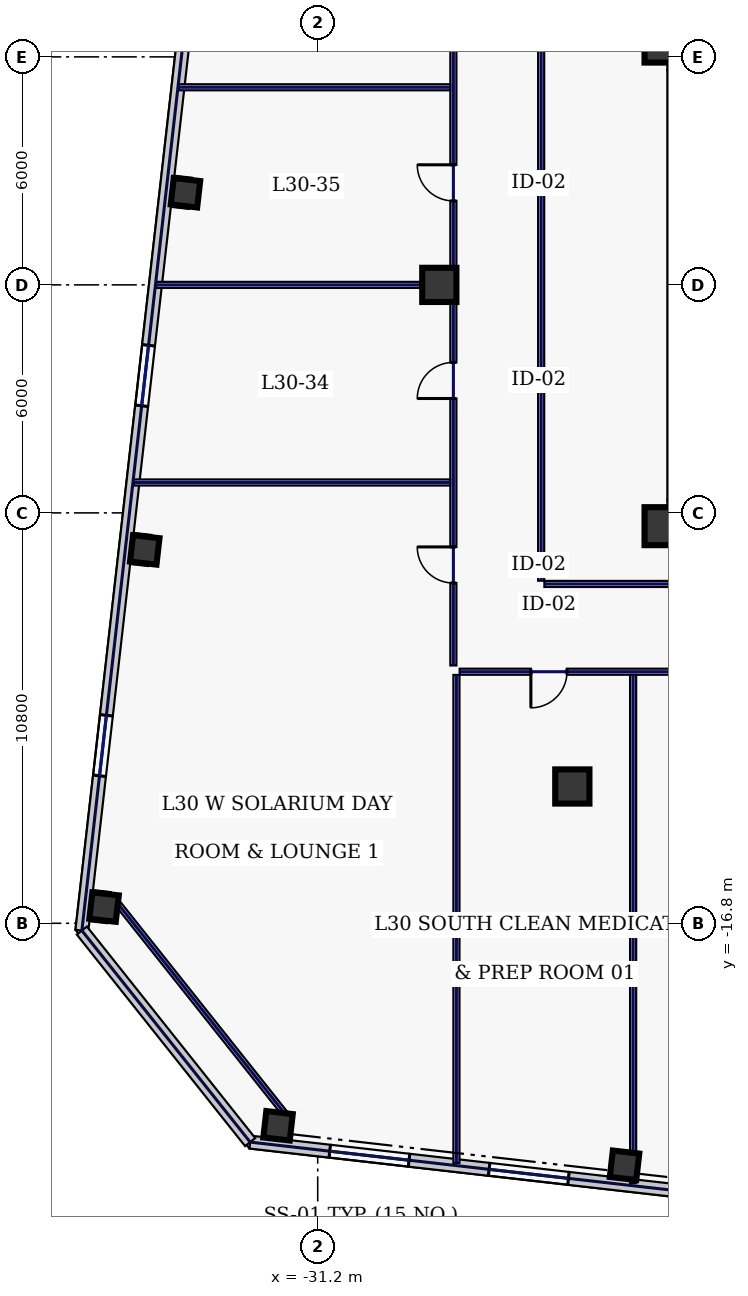
"""IFC4 building model, lengths in metres.
Left out: names, types, materials, properties, quantities, classifications, styles, units other than length and angle.
Written with IfcOpenShell. Run it as: python <this file> out.ifc"""

import sys

from ifc_helpers import new_model, si_unit, direction, frame, frame_2d, origin, origin_2d, place, context, subcontext, project, spatial, rectangle, hollow_rectangle, extrude, element, fill, save


model = new_model("IFC4")
c1 = context("Model", 3, precision=1e-05, world=origin(), true_north=direction((0.0, 1.0)))
c2 = subcontext(c1, "Body", "Model", "MODEL_VIEW")
j1 = project(units=[si_unit("LENGTHUNIT", "METRE"), si_unit("PLANEANGLEUNIT", "RADIAN")], contexts=[c1])
p1 = place(None, origin())
s1 = spatial("IfcSite", under=j1, at=p1, CompositionType="ELEMENT")
p2 = place(p1, origin())
s2 = spatial("IfcBuilding", under=s1, at=p2, CompositionType="ELEMENT")
p3 = place(p2, frame((0.0, 0.0, 133.4)))
s3 = spatial("IfcBuildingStorey", under=s2, at=p3, CompositionType="ELEMENT", Elevation=133.4)
for number, where, z_axis, x_axis in (
    (1, (-22.0, 6.0, 0.0), (0.0, 0.0, 1.0), (1.0, 0.0, 0.0)),
    (2, (-22.0, -6.0, 0.0), (0.0, 0.0, 1.0), (1.0, 0.0, 0.0)),
):
    element("IfcWall", number, at=place(p3, frame(where, z_axis=z_axis, x_axis=x_axis)), inside=s3, PredefinedType="SHEAR", context=c2, shape_type="SweptSolid", body=[
        extrude(rectangle(XDim=11.55, YDim=0.7, at=frame_2d((5.775, 0.0))), origin(), (0.0, 0.0, 1.0), 3.74),
    ])
p4 = place(p3, frame((-21.6, -5.65, 0.0), z_axis=(0.0, 0.0, 1.0), x_axis=(0.0, 1.0, 0.0)))
e3 = element("IfcWall", 3, at=p4, inside=s3, PredefinedType="SHEAR", context=c2, shape_type="SweptSolid", body=[
    extrude(rectangle(XDim=11.3, YDim=0.8, at=frame_2d((5.65, 0.0))), origin(), (0.0, 0.0, 1.0), 3.74),
])
for number, where, z_axis, x_axis in (
    (4, (-22.1, -6.35, 0.0), (0.0, 0.0, 1.0), (1.0, 0.0, 0.0)),
    (5, (-22.1, 6.35, 0.0), (0.0, 0.0, 1.0), (1.0, 0.0, 0.0)),
):
    element("IfcColumn", number, at=place(p3, frame(where, z_axis=z_axis, x_axis=x_axis)), inside=s3, PredefinedType="COLUMN", context=c2, shape_type="SweptSolid", body=[
        extrude(hollow_rectangle(XDim=1.0, YDim=1.0, WallThickness=0.045, at=origin_2d()), origin(), (0.0, 0.0, 1.0), 3.74),
    ])
for number, where, z_axis, x_axis in (
    (6, (-24.5, -13.2, 0.0), (0.0, 0.0, 1.0), (1.0, 0.0, 0.0)),
    (7, (-28.0, 0.0, 0.0), (0.0, 0.0, 1.0), (1.0, 0.0, 0.0)),
):
    element("IfcColumn", number, at=place(p3, frame(where, z_axis=z_axis, x_axis=x_axis)), inside=s3, PredefinedType="COLUMN", context=c2, shape_type="SweptSolid", body=[
        extrude(hollow_rectangle(XDim=0.9, YDim=0.9, WallThickness=0.04, at=origin_2d()), origin(), (0.0, 0.0, 1.0), 3.74),
    ])
for number, where, z_axis, x_axis in (
    (8, (-32.244, -22.129, 0.0), (0.0, 0.0, 1.0), (0.994, -0.113, 0.0)),
    (9, (-23.126, -23.168, 0.0), (0.0, 0.0, 1.0), (0.994, -0.113, 0.0)),
    (10, (-34.68, 2.425, 0.0), (0.0, 0.0, 1.0), (0.994, -0.113, 0.0)),
    (11, (-35.751, -6.974, 0.0), (0.0, 0.0, 1.0), (0.994, -0.113, 0.0)),
    (12, (-36.822, -16.374, 0.0), (0.0, 0.0, 1.0), (0.994, -0.113, 0.0)),
):
    element("IfcColumn", number, at=place(p3, frame(where, z_axis=z_axis, x_axis=x_axis)), inside=s3, PredefinedType="COLUMN", context=c2, shape_type="SweptSolid", body=[
        extrude(hollow_rectangle(XDim=0.7, YDim=0.7, WallThickness=0.032, at=origin_2d()), origin(), (0.0, 0.0, 1.0), 3.74),
    ])
p5 = place(p3, frame((-32.977, -22.559, 0.0), z_axis=(0.0, 0.0, 1.0), x_axis=(0.993571214605, -0.113208840243, 0.0)))
e13 = element("IfcWall", 13, at=p5, inside=s3, PredefinedType="STANDARD", context=c2, shape_type="SweptSolid", body=[
    extrude(rectangle(XDim=21.223, YDim=0.34, at=frame_2d((10.611, 0.0))), origin(), (0.0, 0.0, 1.0), 3.74),
])
p6 = place(p5, frame((2.108, 0.0, 0.67)))
e14 = element("IfcOpeningElement", 14, at=p6, cuts=e13, PredefinedType="OPENING", context=c2, shape_type="SweptSolid", body=[
    extrude(rectangle(XDim=2.1, YDim=2.2, at=frame_2d((1.05, 1.1))), frame((0.0, 0.18, 0.0), z_axis=(0.0, -1.0, 0.0), x_axis=(1.0, 0.0, 0.0)), (0.0, 0.0, 1.0), 0.36),
])
p7 = place(p5, frame((6.329, 0.0, 0.67)))
e15 = element("IfcOpeningElement", 15, at=p7, cuts=e13, PredefinedType="OPENING", context=c2, shape_type="SweptSolid", body=[
    extrude(rectangle(XDim=2.1, YDim=2.2, at=frame_2d((1.05, 1.1))), frame((0.0, 0.18, 0.0), z_axis=(0.0, -1.0, 0.0), x_axis=(1.0, 0.0, 0.0)), (0.0, 0.0, 1.0), 0.36),
])
p8 = place(p5, frame((11.285, 0.0, 0.67)))
e16 = element("IfcOpeningElement", 16, at=p8, cuts=e13, PredefinedType="OPENING", context=c2, shape_type="SweptSolid", body=[
    extrude(rectangle(XDim=2.1, YDim=2.2, at=frame_2d((1.05, 1.1))), frame((0.0, 0.18, 0.0), z_axis=(0.0, -1.0, 0.0), x_axis=(1.0, 0.0, 0.0)), (0.0, 0.0, 1.0), 0.36),
])
p9 = place(p5, frame((16.756, 0.0, 0.67)))
e17 = element("IfcOpeningElement", 17, at=p9, cuts=e13, PredefinedType="OPENING", context=c2, shape_type="SweptSolid", body=[
    extrude(rectangle(XDim=0.85, YDim=1.85, at=frame_2d((0.425, 0.925))), frame((0.0, 0.18, 0.0), z_axis=(0.0, -1.0, 0.0), x_axis=(1.0, 0.0, 0.0)), (0.0, 0.0, 1.0), 0.36),
])
p10 = place(p3, frame((-32.968, 21.957, 0.0), z_axis=(0.0, 0.0, 1.0), x_axis=(-0.113201605824, -0.993572038877, 0.0)))
e18 = element("IfcWall", 18, at=p10, inside=s3, PredefinedType="STANDARD", context=c2, shape_type="SweptSolid", body=[
    extrude(rectangle(XDim=39.2, YDim=0.34, at=frame_2d((19.6, 0.0))), origin(), (0.0, 0.0, 1.0), 3.74),
])
p11 = place(p10, frame((4.1, 0.0, 0.58)))
e19 = element("IfcOpeningElement", 19, at=p11, cuts=e18, PredefinedType="OPENING", context=c2, shape_type="SweptSolid", body=[
    extrude(rectangle(XDim=1.6, YDim=2.3, at=frame_2d((0.8, 1.15))), frame((0.0, 0.18, 0.0), z_axis=(0.0, -1.0, 0.0), x_axis=(1.0, 0.0, 0.0)), (0.0, 0.0, 1.0), 0.36),
])
p12 = place(p10, frame((13.9, 0.0, 0.58)))
e20 = element("IfcOpeningElement", 20, at=p12, cuts=e18, PredefinedType="OPENING", context=c2, shape_type="SweptSolid", body=[
    extrude(rectangle(XDim=1.6, YDim=2.3, at=frame_2d((0.8, 1.15))), frame((0.0, 0.18, 0.0), z_axis=(0.0, -1.0, 0.0), x_axis=(1.0, 0.0, 0.0)), (0.0, 0.0, 1.0), 0.36),
])
p13 = place(p10, frame((23.7, 0.0, 0.58)))
e21 = element("IfcOpeningElement", 21, at=p13, cuts=e18, PredefinedType="OPENING", context=c2, shape_type="SweptSolid", body=[
    extrude(rectangle(XDim=1.6, YDim=2.3, at=frame_2d((0.8, 1.15))), frame((0.0, 0.18, 0.0), z_axis=(0.0, -1.0, 0.0), x_axis=(1.0, 0.0, 0.0)), (0.0, 0.0, 1.0), 0.36),
])
p14 = place(p10, frame((33.5, 0.0, 0.58)))
e22 = element("IfcOpeningElement", 22, at=p14, cuts=e18, PredefinedType="OPENING", context=c2, shape_type="SweptSolid", body=[
    extrude(rectangle(XDim=1.6, YDim=2.3, at=frame_2d((0.8, 1.15))), frame((0.0, 0.18, 0.0), z_axis=(0.0, -1.0, 0.0), x_axis=(1.0, 0.0, 0.0)), (0.0, 0.0, 1.0), 0.36),
])
p15 = place(p3, frame((-37.406, -16.991, 0.0), z_axis=(0.0, 0.0, 1.0), x_axis=(0.622507800567, -0.78261359446, 0.0)))
e23 = element("IfcWall", 23, at=p15, inside=s3, PredefinedType="STANDARD", context=c2, shape_type="SweptSolid", body=[
    extrude(rectangle(XDim=7.114, YDim=0.34, at=frame_2d((3.557, 0.0))), origin(), (0.0, 0.0, 1.0), 3.74),
])
p16 = place(p3, frame((-36.556, -16.162, 0.0), z_axis=(0.0, 0.0, 1.0), x_axis=(0.622522641622, -0.782601789334, 0.0)))
e24 = element("IfcWall", 24, at=p16, inside=s3, PredefinedType="PARTITIONING", context=c2, shape_type="SweptSolid", body=[
    extrude(rectangle(XDim=7.354, YDim=0.16, at=frame_2d((3.677, 0.0))), origin(), (0.0, 0.0, 1.0), 3.74),
])
p17 = place(p3, frame((-27.63, -10.015, 0.0), z_axis=(0.0, 0.0, 1.0), x_axis=(0.0, 1.0, 0.0)))
e25 = element("IfcWall", 25, at=p17, inside=s3, PredefinedType="PARTITIONING", context=c2, shape_type="SweptSolid", body=[
    extrude(rectangle(XDim=20.13, YDim=0.16, at=frame_2d((10.065, 0.0))), origin(), (0.0, 0.0, 1.0), 3.74),
])
p18 = place(p17, frame((2.169, 0.0, 0.0)))
e26 = element("IfcOpeningElement", 26, at=p18, cuts=e25, PredefinedType="OPENING", context=c2, shape_type="SweptSolid", body=[
    extrude(rectangle(XDim=0.95, YDim=2.2, at=frame_2d((0.475, 1.1))), frame((0.0, 0.09, 0.0), z_axis=(0.0, -1.0, 0.0), x_axis=(1.0, 0.0, 0.0)), (0.0, 0.0, 1.0), 0.18),
])
p19 = place(p17, frame((7.025, 0.0, 0.0)))
e27 = element("IfcOpeningElement", 27, at=p19, cuts=e25, PredefinedType="OPENING", context=c2, shape_type="SweptSolid", body=[
    extrude(rectangle(XDim=0.95, YDim=2.2, at=frame_2d((0.475, 1.1))), frame((0.0, 0.09, 0.0), z_axis=(0.0, -1.0, 0.0), x_axis=(1.0, 0.0, 0.0)), (0.0, 0.0, 1.0), 0.18),
])
p20 = place(p17, frame((12.225, 0.0, 0.0)))
e28 = element("IfcOpeningElement", 28, at=p20, cuts=e25, PredefinedType="OPENING", context=c2, shape_type="SweptSolid", body=[
    extrude(rectangle(XDim=0.95, YDim=2.2, at=frame_2d((0.475, 1.1))), frame((0.0, 0.09, 0.0), z_axis=(0.0, -1.0, 0.0), x_axis=(1.0, 0.0, 0.0)), (0.0, 0.0, 1.0), 0.18),
])
p21 = place(p17, frame((17.131, 0.0, 0.0)))
e29 = element("IfcOpeningElement", 29, at=p21, cuts=e25, PredefinedType="OPENING", context=c2, shape_type="SweptSolid", body=[
    extrude(rectangle(XDim=0.95, YDim=2.2, at=frame_2d((0.475, 1.1))), frame((0.0, 0.09, 0.0), z_axis=(0.0, -1.0, 0.0), x_axis=(1.0, 0.0, 0.0)), (0.0, 0.0, 1.0), 0.18),
])
p22 = place(p3, frame((27.465, -10.18, 0.0), z_axis=(0.0, 0.0, 1.0), x_axis=(-1.0, 0.0, 0.0)))
e30 = element("IfcWall", 30, at=p22, inside=s3, PredefinedType="PARTITIONING", context=c2, shape_type="SweptSolid", body=[
    extrude(rectangle(XDim=54.93, YDim=0.16, at=frame_2d((27.465, 0.0))), origin(), (0.0, 0.0, 1.0), 3.74),
])
p23 = place(p22, frame((52.106, 0.0, 0.0)))
e31 = element("IfcOpeningElement", 31, at=p23, cuts=e30, PredefinedType="OPENING", context=c2, shape_type="SweptSolid", body=[
    extrude(rectangle(XDim=0.95, YDim=2.2, at=frame_2d((0.475, 1.1))), frame((0.0, 0.09, 0.0), z_axis=(0.0, -1.0, 0.0), x_axis=(1.0, 0.0, 0.0)), (0.0, 0.0, 1.0), 0.18),
])
p24 = place(p22, frame((47.05, 0.0, 0.0)))
e32 = element("IfcOpeningElement", 32, at=p24, cuts=e30, PredefinedType="OPENING", context=c2, shape_type="SweptSolid", body=[
    extrude(rectangle(XDim=0.95, YDim=2.2, at=frame_2d((0.475, 1.1))), frame((0.0, 0.09, 0.0), z_axis=(0.0, -1.0, 0.0), x_axis=(1.0, 0.0, 0.0)), (0.0, 0.0, 1.0), 0.18),
])
p25 = place(p22, frame((41.65, 0.0, 0.0)))
e33 = element("IfcOpeningElement", 33, at=p25, cuts=e30, PredefinedType="OPENING", context=c2, shape_type="SweptSolid", body=[
    extrude(rectangle(XDim=0.95, YDim=2.2, at=frame_2d((0.475, 1.1))), frame((0.0, 0.09, 0.0), z_axis=(0.0, -1.0, 0.0), x_axis=(1.0, 0.0, 0.0)), (0.0, 0.0, 1.0), 0.18),
])
p26 = place(p22, frame((35.825, 0.0, 0.0)))
e34 = element("IfcOpeningElement", 34, at=p26, cuts=e30, PredefinedType="OPENING", context=c2, shape_type="SweptSolid", body=[
    extrude(rectangle(XDim=0.95, YDim=2.2, at=frame_2d((0.475, 1.1))), frame((0.0, 0.09, 0.0), z_axis=(0.0, -1.0, 0.0), x_axis=(1.0, 0.0, 0.0)), (0.0, 0.0, 1.0), 0.18),
])
p27 = place(p22, frame((29.575, 0.0, 0.0)))
e35 = element("IfcOpeningElement", 35, at=p27, cuts=e30, PredefinedType="OPENING", context=c2, shape_type="SweptSolid", body=[
    extrude(rectangle(XDim=0.95, YDim=2.2, at=frame_2d((0.475, 1.1))), frame((0.0, 0.09, 0.0), z_axis=(0.0, -1.0, 0.0), x_axis=(1.0, 0.0, 0.0)), (0.0, 0.0, 1.0), 0.18),
])
p28 = place(p22, frame((23.285, 0.0, 0.0)))
e36 = element("IfcOpeningElement", 36, at=p28, cuts=e30, PredefinedType="OPENING", context=c2, shape_type="SweptSolid", body=[
    extrude(rectangle(XDim=0.95, YDim=2.2, at=frame_2d((0.475, 1.1))), frame((0.0, 0.09, 0.0), z_axis=(0.0, -1.0, 0.0), x_axis=(1.0, 0.0, 0.0)), (0.0, 0.0, 1.0), 0.18),
])
p29 = place(p22, frame((16.78, 0.0, 0.0)))
e37 = element("IfcOpeningElement", 37, at=p29, cuts=e30, PredefinedType="OPENING", context=c2, shape_type="SweptSolid", body=[
    extrude(rectangle(XDim=1.3, YDim=2.2, at=frame_2d((0.65, 1.1))), frame((0.0, 0.09, 0.0), z_axis=(0.0, -1.0, 0.0), x_axis=(1.0, 0.0, 0.0)), (0.0, 0.0, 1.0), 0.18),
])
p30 = place(p22, frame((11.23, 0.0, 0.0)))
e38 = element("IfcOpeningElement", 38, at=p30, cuts=e30, PredefinedType="OPENING", context=c2, shape_type="SweptSolid", body=[
    extrude(rectangle(XDim=1.3, YDim=2.2, at=frame_2d((0.65, 1.1))), frame((0.0, 0.09, 0.0), z_axis=(0.0, -1.0, 0.0), x_axis=(1.0, 0.0, 0.0)), (0.0, 0.0, 1.0), 0.18),
])
p31 = place(p22, frame((6.46, 0.0, 0.0)))
e39 = element("IfcOpeningElement", 39, at=p31, cuts=e30, PredefinedType="OPENING", context=c2, shape_type="SweptSolid", body=[
    extrude(rectangle(XDim=1.3, YDim=2.2, at=frame_2d((0.65, 1.1))), frame((0.0, 0.09, 0.0), z_axis=(0.0, -1.0, 0.0), x_axis=(1.0, 0.0, 0.0)), (0.0, 0.0, 1.0), 0.18),
])
p32 = place(p22, frame((2.194, 0.0, 0.0)))
e40 = element("IfcOpeningElement", 40, at=p32, cuts=e30, PredefinedType="OPENING", context=c2, shape_type="SweptSolid", body=[
    extrude(rectangle(XDim=0.95, YDim=2.2, at=frame_2d((0.475, 1.1))), frame((0.0, 0.09, 0.0), z_axis=(0.0, -1.0, 0.0), x_axis=(1.0, 0.0, 0.0)), (0.0, 0.0, 1.0), 0.18),
])
p33 = place(p3, frame((-25.32, 7.885, 0.0), z_axis=(0.0, 0.0, 1.0), x_axis=(0.0, -1.0, 0.0)))
e41 = element("IfcWall", 41, at=p33, inside=s3, PredefinedType="PARTITIONING", context=c2, shape_type="SweptSolid", body=[
    extrude(rectangle(XDim=15.67, YDim=0.16, at=frame_2d((7.835, 0.0))), origin(), (0.0, 0.0, 1.0), 3.74),
])
p34 = place(p3, frame((-25.235, -7.87, 0.0), z_axis=(0.0, 0.0, 1.0), x_axis=(1.0, 0.0, 0.0)))
e42 = element("IfcWall", 42, at=p34, inside=s3, PredefinedType="PARTITIONING", context=c2, shape_type="SweptSolid", body=[
    extrude(rectangle(XDim=14.57, YDim=0.16, at=frame_2d((7.285, 0.0))), origin(), (0.0, 0.0, 1.0), 3.74),
])
p35 = place(p3, frame((-27.55, -23.106, 0.0), z_axis=(0.0, 0.0, 1.0), x_axis=(0.0, 1.0, 0.0)))
e43 = element("IfcWall", 43, at=p35, inside=s3, PredefinedType="PARTITIONING", context=c2, shape_type="SweptSolid", body=[
    extrude(rectangle(XDim=12.842, YDim=0.16, at=frame_2d((6.421, 0.0))), origin(), (0.0, 0.0, 1.0), 3.74),
])
p36 = place(p3, frame((-22.9, -23.636, 0.0), z_axis=(0.0, 0.0, 1.0), x_axis=(0.0, 1.0, 0.0)))
e44 = element("IfcWall", 44, at=p36, inside=s3, PredefinedType="PARTITIONING", context=c2, shape_type="SweptSolid", body=[
    extrude(rectangle(XDim=13.371, YDim=0.16, at=frame_2d((6.686, 0.0))), origin(), (0.0, 0.0, 1.0), 3.74),
])
p37 = place(p3, frame((-36.042, -5.2, 0.0), z_axis=(0.0, 0.0, 1.0), x_axis=(1.0, 0.0, 0.0)))
e45 = element("IfcWall", 45, at=p37, inside=s3, PredefinedType="PARTITIONING", context=c2, shape_type="SweptSolid", body=[
    extrude(rectangle(XDim=8.327, YDim=0.16, at=frame_2d((4.164, 0.0))), origin(), (0.0, 0.0, 1.0), 3.74),
])
p38 = place(p3, frame((-35.449, 0.0, 0.0), z_axis=(0.0, 0.0, 1.0), x_axis=(1.0, 0.0, 0.0)))
e46 = element("IfcWall", 46, at=p38, inside=s3, PredefinedType="PARTITIONING", context=c2, shape_type="SweptSolid", body=[
    extrude(rectangle(XDim=7.734, YDim=0.16, at=frame_2d((3.867, 0.0))), origin(), (0.0, 0.0, 1.0), 3.74),
])
p39 = place(p3, frame((-34.857, 5.2, 0.0), z_axis=(0.0, 0.0, 1.0), x_axis=(1.0, 0.0, 0.0)))
e47 = element("IfcWall", 47, at=p39, inside=s3, PredefinedType="PARTITIONING", context=c2, shape_type="SweptSolid", body=[
    extrude(rectangle(XDim=7.142, YDim=0.16, at=frame_2d((3.571, 0.0))), origin(), (0.0, 0.0, 1.0), 3.74),
])
p40 = place(p6, origin())
e48 = element("IfcWindow", 48, at=p40, inside=s3, PartitioningType="SINGLE_PANEL", PredefinedType="WINDOW", context=c2, shape_type="SweptSolid", body=[
    extrude(rectangle(XDim=2.1, YDim=2.2, at=frame_2d((1.05, 1.1))), frame((0.0, 0.03, 0.0), z_axis=(0.0, -1.0, 0.0), x_axis=(1.0, 0.0, 0.0)), (0.0, 0.0, 1.0), 0.06),
])
fill(e14, e48)
p41 = place(p7, origin())
e49 = element("IfcWindow", 49, at=p41, inside=s3, PartitioningType="SINGLE_PANEL", PredefinedType="WINDOW", context=c2, shape_type="SweptSolid", body=[
    extrude(rectangle(XDim=2.1, YDim=2.2, at=frame_2d((1.05, 1.1))), frame((0.0, 0.03, 0.0), z_axis=(0.0, -1.0, 0.0), x_axis=(1.0, 0.0, 0.0)), (0.0, 0.0, 1.0), 0.06),
])
fill(e15, e49)
p42 = place(p13, origin())
e50 = element("IfcWindow", 50, at=p42, inside=s3, PartitioningType="SINGLE_PANEL", PredefinedType="WINDOW", context=c2, shape_type="SweptSolid", body=[
    extrude(rectangle(XDim=1.6, YDim=2.3, at=frame_2d((0.8, 1.15))), frame((0.0, 0.03, 0.0), z_axis=(0.0, -1.0, 0.0), x_axis=(1.0, 0.0, 0.0)), (0.0, 0.0, 1.0), 0.06),
])
fill(e21, e50)
p43 = place(p14, origin())
e51 = element("IfcWindow", 51, at=p43, inside=s3, PartitioningType="SINGLE_PANEL", PredefinedType="WINDOW", context=c2, shape_type="SweptSolid", body=[
    extrude(rectangle(XDim=1.6, YDim=2.3, at=frame_2d((0.8, 1.15))), frame((0.0, 0.03, 0.0), z_axis=(0.0, -1.0, 0.0), x_axis=(1.0, 0.0, 0.0)), (0.0, 0.0, 1.0), 0.06),
])
fill(e22, e51)
p44 = place(p23, origin())
e52 = element("IfcDoor", 52, at=p44, inside=s3, OperationType="SINGLE_SWING_RIGHT", PredefinedType="DOOR", context=c2, shape_type="SweptSolid", body=[
    extrude(rectangle(XDim=0.95, YDim=2.2, at=frame_2d((0.475, 1.1))), frame((0.0, 0.025, 0.0), z_axis=(0.0, -1.0, 0.0), x_axis=(1.0, 0.0, 0.0)), (0.0, 0.0, 1.0), 0.05),
])
fill(e31, e52)
p45 = place(p18, origin())
e53 = element("IfcDoor", 53, at=p45, inside=s3, OperationType="SINGLE_SWING_RIGHT", PredefinedType="DOOR", context=c2, shape_type="SweptSolid", body=[
    extrude(rectangle(XDim=0.95, YDim=2.2, at=frame_2d((0.475, 1.1))), frame((0.0, 0.025, 0.0), z_axis=(0.0, -1.0, 0.0), x_axis=(1.0, 0.0, 0.0)), (0.0, 0.0, 1.0), 0.05),
])
fill(e26, e53)
p46 = place(p19, origin())
e54 = element("IfcDoor", 54, at=p46, inside=s3, OperationType="SINGLE_SWING_LEFT", PredefinedType="DOOR", context=c2, shape_type="SweptSolid", body=[
    extrude(rectangle(XDim=0.95, YDim=2.2, at=frame_2d((0.475, 1.1))), frame((0.0, 0.025, 0.0), z_axis=(0.0, -1.0, 0.0), x_axis=(1.0, 0.0, 0.0)), (0.0, 0.0, 1.0), 0.05),
])
fill(e27, e54)
p47 = place(p20, origin())
e55 = element("IfcDoor", 55, at=p47, inside=s3, OperationType="SINGLE_SWING_RIGHT", PredefinedType="DOOR", context=c2, shape_type="SweptSolid", body=[
    extrude(rectangle(XDim=0.95, YDim=2.2, at=frame_2d((0.475, 1.1))), frame((0.0, 0.025, 0.0), z_axis=(0.0, -1.0, 0.0), x_axis=(1.0, 0.0, 0.0)), (0.0, 0.0, 1.0), 0.05),
])
fill(e28, e55)
save(model, sys.argv[1])
